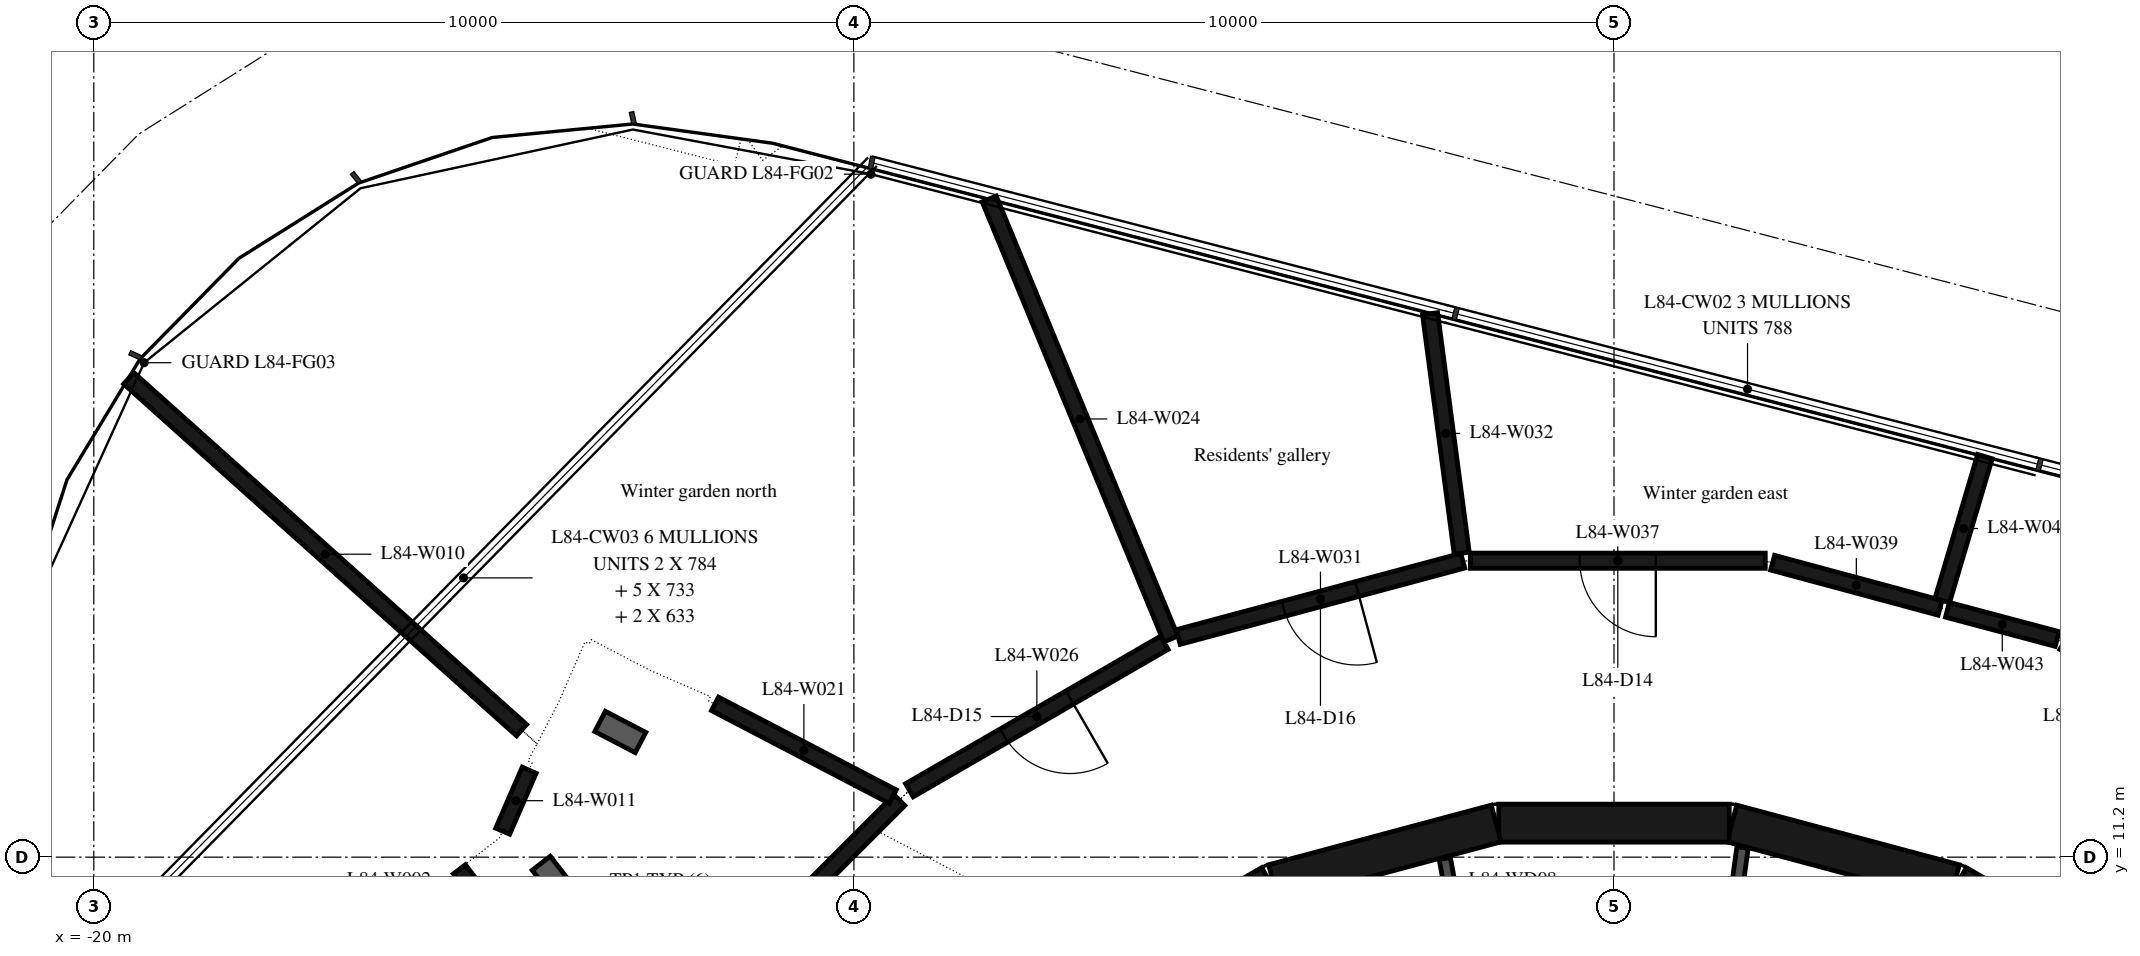
"""IFC4 building model, lengths in metres.
Left out: names, types, materials, properties, quantities, classifications, styles, units other than length and angle.
Written with IfcOpenShell. Run it as: python <this file> out.ifc"""

import sys

from ifc_helpers import new_model, si_unit, direction, frame, frame_2d, origin, place, context, subcontext, project, spatial, rectangle, extrude, element, fill, save


model = new_model("IFC4")
c1 = context("Model", 3, precision=1e-05, world=origin(), true_north=direction((0.0, 1.0)))
c2 = subcontext(c1, "Body", "Model", "MODEL_VIEW")
j1 = project(units=[si_unit("LENGTHUNIT", "METRE"), si_unit("PLANEANGLEUNIT", "RADIAN")], contexts=[c1])
p1 = place(None, origin())
s1 = spatial("IfcSite", under=j1, at=p1, CompositionType="ELEMENT")
p2 = place(p1, origin())
s2 = spatial("IfcBuilding", under=s1, at=p2, CompositionType="ELEMENT")
p3 = place(p2, frame((0.0, 0.0, 326.2)))
s3 = spatial("IfcBuildingStorey", under=s2, at=p3, CompositionType="ELEMENT", Elevation=326.2)
p4 = place(p3, frame((7.137, 9.329, 0.0), z_axis=(0.0, 0.0, 1.0), x_axis=(-0.865975092491, 0.500087131594, 0.0)))
e1 = element("IfcWall", 1, at=p4, inside=s3, PredefinedType="SHEAR", context=c2, shape_type="SweptSolid", body=[
    extrude(rectangle(XDim=3.033, YDim=0.5, at=frame_2d((1.516, 0.0))), origin(), (0.0, 0.0, 1.0), 6.35),
])
p5 = place(p4, frame((1.066, 0.0, 0.0)))
e2 = element("IfcOpeningElement", 2, at=p5, cuts=e1, PredefinedType="OPENING", context=c2, shape_type="SweptSolid", body=[
    extrude(rectangle(XDim=0.9, YDim=2.1, at=frame_2d((0.45, 1.05))), frame((0.0, 0.26, 0.0), z_axis=(0.0, -1.0, 0.0), x_axis=(1.0, 0.0, 0.0)), (0.0, 0.0, 1.0), 0.52),
])
for number, where, z_axis, x_axis in (
    (3, (4.479, 10.858, 0.0), (0.0, 0.0, 1.0), (-0.966, 0.259, 0.0)),
    (4, (1.516, 11.647, 0.0), (0.0, 0.0, 1.0), (-1.0, 0.0, 0.0)),
    (5, (-1.55, 11.643, 0.0), (0.0, 0.0, 1.0), (-0.966, -0.259, 0.0)),
    (6, (-4.51, 10.845, 0.0), (0.0, 0.0, 1.0), (-0.866, -0.5, 0.0)),
):
    element("IfcWall", number, at=place(p3, frame(where, z_axis=z_axis, x_axis=x_axis)), inside=s3, PredefinedType="SHEAR", context=c2, shape_type="SweptSolid", body=[
        extrude(rectangle(XDim=3.033, YDim=0.5, at=frame_2d((1.516, 0.0))), origin(), (0.0, 0.0, 1.0), 6.35),
    ])
p6 = place(p3, frame((1.691, 11.326, 0.0), z_axis=(0.0, 0.0, 1.0), x_axis=(-0.135344253201, -0.990798633994, 0.0)))
e7 = element("IfcWall", 7, at=p6, inside=s3, PredefinedType="PARTITIONING", context=c2, shape_type="SweptSolid", body=[
    extrude(rectangle(XDim=2.358, YDim=0.15, at=frame_2d((1.179, 0.0))), origin(), (0.0, 0.0, 1.0), 6.35),
])
p7 = place(p6, frame((0.729, 0.0, 0.0)))
e8 = element("IfcOpeningElement", 8, at=p7, cuts=e7, PredefinedType="OPENING", context=c2, shape_type="SweptSolid", body=[
    extrude(rectangle(XDim=0.9, YDim=2.1, at=frame_2d((0.45, 1.05))), frame((0.0, 0.085, 0.0), z_axis=(0.0, -1.0, 0.0), x_axis=(1.0, 0.0, 0.0)), (0.0, 0.0, 1.0), 0.17),
])
p8 = place(p3, frame((-1.825, 8.99, 0.0), z_axis=(0.0, 0.0, 1.0), x_axis=(-0.179955206115, 0.983674805915, 0.0)))
e9 = element("IfcWall", 9, at=p8, inside=s3, PredefinedType="PARTITIONING", context=c2, shape_type="SweptSolid", body=[
    extrude(rectangle(XDim=2.229, YDim=0.15, at=frame_2d((1.115, 0.0))), origin(), (0.0, 0.0, 1.0), 6.35),
])
p9 = place(p8, frame((0.665, 0.0, 0.0)))
e10 = element("IfcOpeningElement", 10, at=p9, cuts=e9, PredefinedType="OPENING", context=c2, shape_type="SweptSolid", body=[
    extrude(rectangle(XDim=0.9, YDim=2.1, at=frame_2d((0.45, 1.05))), frame((0.0, 0.085, 0.0), z_axis=(0.0, -1.0, 0.0), x_axis=(1.0, 0.0, 0.0)), (0.0, 0.0, 1.0), 0.17),
])
p10 = place(p3, frame((-15.19, 11.04, 0.0), z_axis=(0.0, 0.0, 1.0), x_axis=(0.604283722932, -0.796769215143, 0.0)))
e11 = element("IfcWall", 11, at=p10, inside=s3, PredefinedType="PARTITIONING", context=c2, shape_type="SweptSolid", body=[
    extrude(rectangle(XDim=0.364, YDim=0.2, at=frame_2d((0.182, 0.0))), origin(), (0.0, 0.0, 1.0), 6.35),
])
p11 = place(p3, frame((-14.372, 12.871, 0.0), z_axis=(0.0, 0.0, 1.0), x_axis=(-0.744887799674, 0.667189752542, 0.0)))
e12 = element("IfcWall", 12, at=p11, inside=s3, PredefinedType="PARTITIONING", context=c2, shape_type="SweptSolid", body=[
    extrude(rectangle(XDim=6.938, YDim=0.2, at=frame_2d((3.469, 0.0))), origin(), (0.0, 0.0, 1.0), 6.35),
])
p12 = place(p3, frame((-14.272, 12.344, 0.0), z_axis=(0.0, 0.0, 1.0), x_axis=(-0.39832800457, -0.91724304346, 0.0)))
e13 = element("IfcWall", 13, at=p12, inside=s3, PredefinedType="PARTITIONING", context=c2, shape_type="SweptSolid", body=[
    extrude(rectangle(XDim=0.875, YDim=0.2, at=frame_2d((0.437, 0.0))), origin(), (0.0, 0.0, 1.0), 6.35),
])
p13 = place(p3, frame((-12.009, 9.341, 0.0), z_axis=(0.0, 0.0, 1.0), x_axis=(0.707139861432, 0.707073699394, 0.0)))
e14 = element("IfcWall", 14, at=p13, inside=s3, PredefinedType="PARTITIONING", context=c2, shape_type="SweptSolid", body=[
    extrude(rectangle(XDim=3.69, YDim=0.2, at=frame_2d((1.845, 0.0))), origin(), (0.0, 0.0, 1.0), 6.35),
])
p14 = place(p3, frame((-9.489, 11.996, 0.0), z_axis=(0.0, 0.0, 1.0), x_axis=(-0.886536984928, 0.462657729163, 0.0)))
e15 = element("IfcWall", 15, at=p14, inside=s3, PredefinedType="PARTITIONING", context=c2, shape_type="SweptSolid", body=[
    extrude(rectangle(XDim=2.638, YDim=0.2, at=frame_2d((1.319, 0.0))), origin(), (0.0, 0.0, 1.0), 6.35),
])
p15 = place(p3, frame((-8.22, 19.86, 0.0), z_axis=(0.0, 0.0, 1.0), x_axis=(0.381535759917, -0.924354079292, 0.0)))
e16 = element("IfcWall", 16, at=p15, inside=s3, PredefinedType="PARTITIONING", context=c2, shape_type="SweptSolid", body=[
    extrude(rectangle(XDim=6.264, YDim=0.2, at=frame_2d((3.132, 0.0))), origin(), (0.0, 0.0, 1.0), 6.35),
])
p16 = place(p3, frame((-5.917, 14.02, 0.0), z_axis=(0.0, 0.0, 1.0), x_axis=(-0.865601686425, -0.500733182901, 0.0)))
e17 = element("IfcWall", 17, at=p16, inside=s3, PredefinedType="PARTITIONING", context=c2, shape_type="SweptSolid", body=[
    extrude(rectangle(XDim=3.874, YDim=0.2, at=frame_2d((1.937, 0.0))), origin(), (0.0, 0.0, 1.0), 6.35),
])
p17 = place(p16, frame((1.437, 0.0, 0.0)))
e18 = element("IfcOpeningElement", 18, at=p17, cuts=e17, PredefinedType="OPENING", context=c2, shape_type="SweptSolid", body=[
    extrude(rectangle(XDim=1.0, YDim=2.1, at=frame_2d((0.5, 1.05))), frame((0.0, 0.11, 0.0), z_axis=(0.0, -1.0, 0.0), x_axis=(1.0, 0.0, 0.0)), (0.0, 0.0, 1.0), 0.22),
])
p18 = place(p3, frame((-1.99, 15.1, 0.0), z_axis=(0.0, 0.0, 1.0), x_axis=(-0.96585437197, -0.259085569159, 0.0)))
e19 = element("IfcWall", 19, at=p18, inside=s3, PredefinedType="PARTITIONING", context=c2, shape_type="SweptSolid", body=[
    extrude(rectangle(XDim=3.876, YDim=0.2, at=frame_2d((1.938, 0.0))), origin(), (0.0, 0.0, 1.0), 6.35),
])
p19 = place(p18, frame((1.438, 0.0, 0.0)))
e20 = element("IfcOpeningElement", 20, at=p19, cuts=e19, PredefinedType="OPENING", context=c2, shape_type="SweptSolid", body=[
    extrude(rectangle(XDim=1.0, YDim=2.1, at=frame_2d((0.5, 1.05))), frame((0.0, 0.11, 0.0), z_axis=(0.0, -1.0, 0.0), x_axis=(1.0, 0.0, 0.0)), (0.0, 0.0, 1.0), 0.22),
])
p20 = place(p3, frame((-2.003, 15.199, 0.0), z_axis=(0.0, 0.0, 1.0), x_axis=(-0.131122124818, 0.99136622314, 0.0)))
e21 = element("IfcWall", 21, at=p20, inside=s3, PredefinedType="PARTITIONING", context=c2, shape_type="SweptSolid", body=[
    extrude(rectangle(XDim=3.178, YDim=0.2, at=frame_2d((1.589, 0.0))), origin(), (0.0, 0.0, 1.0), 6.35),
])
p21 = place(p3, frame((1.99, 15.1, 0.0), z_axis=(0.0, 0.0, 1.0), x_axis=(-1.0, 0.0, 0.0)))
e22 = element("IfcWall", 22, at=p21, inside=s3, PredefinedType="PARTITIONING", context=c2, shape_type="SweptSolid", body=[
    extrude(rectangle(XDim=3.88, YDim=0.2, at=frame_2d((1.94, 0.0))), origin(), (0.0, 0.0, 1.0), 6.35),
])
p22 = place(p21, frame((1.44, 0.0, 0.0)))
e23 = element("IfcOpeningElement", 23, at=p22, cuts=e22, PredefinedType="OPENING", context=c2, shape_type="SweptSolid", body=[
    extrude(rectangle(XDim=1.0, YDim=2.1, at=frame_2d((0.5, 1.05))), frame((0.0, 0.11, 0.0), z_axis=(0.0, -1.0, 0.0), x_axis=(1.0, 0.0, 0.0)), (0.0, 0.0, 1.0), 0.22),
])
p23 = place(p3, frame((4.29, 14.48, 0.0), z_axis=(0.0, 0.0, 1.0), x_axis=(-0.965529971304, 0.260291902513, 0.0)))
e24 = element("IfcWall", 24, at=p23, inside=s3, PredefinedType="PARTITIONING", context=c2, shape_type="SweptSolid", body=[
    extrude(rectangle(XDim=2.282, YDim=0.2, at=frame_2d((1.141, 0.0))), origin(), (0.0, 0.0, 1.0), 6.35),
])
p24 = place(p3, frame((4.318, 14.576, 0.0), z_axis=(0.0, 0.0, 1.0), x_axis=(0.284239804346, 0.958753218313, 0.0)))
e25 = element("IfcWall", 25, at=p24, inside=s3, PredefinedType="PARTITIONING", context=c2, shape_type="SweptSolid", body=[
    extrude(rectangle(XDim=1.976, YDim=0.2, at=frame_2d((0.988, 0.0))), origin(), (0.0, 0.0, 1.0), 6.35),
])
p25 = place(p3, frame((5.83, 14.07, 0.0), z_axis=(0.0, 0.0, 1.0), x_axis=(-0.966337953359, 0.257276038327, 0.0)))
e26 = element("IfcWall", 26, at=p25, inside=s3, PredefinedType="PARTITIONING", context=c2, shape_type="SweptSolid", body=[
    extrude(rectangle(XDim=1.494, YDim=0.2, at=frame_2d((0.747, 0.0))), origin(), (0.0, 0.0, 1.0), 6.35),
])
p26 = place(p3, frame((9.27, 12.08, 0.0), z_axis=(0.0, 0.0, 1.0), x_axis=(-0.865601686425, 0.500733182901, 0.0)))
e27 = element("IfcWall", 27, at=p26, inside=s3, PredefinedType="PARTITIONING", context=c2, shape_type="SweptSolid", body=[
    extrude(rectangle(XDim=3.874, YDim=0.2, at=frame_2d((1.937, 0.0))), origin(), (0.0, 0.0, 1.0), 6.35),
])
p27 = place(p26, frame((1.437, 0.0, 0.0)))
e28 = element("IfcOpeningElement", 28, at=p27, cuts=e27, PredefinedType="OPENING", context=c2, shape_type="SweptSolid", body=[
    extrude(rectangle(XDim=1.0, YDim=2.1, at=frame_2d((0.5, 1.05))), frame((0.0, 0.11, 0.0), z_axis=(0.0, -1.0, 0.0), x_axis=(1.0, 0.0, 0.0)), (0.0, 0.0, 1.0), 0.22),
])
p28 = place(p22, origin())
e29 = element("IfcDoor", 29, at=p28, inside=s3, OperationType="SINGLE_SWING_LEFT", PredefinedType="DOOR", context=c2, shape_type="SweptSolid", body=[
    extrude(rectangle(XDim=1.0, YDim=2.1, at=frame_2d((0.5, 1.05))), frame((0.0, 0.025, 0.0), z_axis=(0.0, -1.0, 0.0), x_axis=(1.0, 0.0, 0.0)), (0.0, 0.0, 1.0), 0.05),
])
fill(e23, e29)
p29 = place(p17, origin())
e30 = element("IfcDoor", 30, at=p29, inside=s3, OperationType="SINGLE_SWING_LEFT", PredefinedType="DOOR", context=c2, shape_type="SweptSolid", body=[
    extrude(rectangle(XDim=1.0, YDim=2.1, at=frame_2d((0.5, 1.05))), frame((0.0, 0.025, 0.0), z_axis=(0.0, -1.0, 0.0), x_axis=(1.0, 0.0, 0.0)), (0.0, 0.0, 1.0), 0.05),
])
fill(e18, e30)
p30 = place(p19, origin())
e31 = element("IfcDoor", 31, at=p30, inside=s3, OperationType="SINGLE_SWING_LEFT", PredefinedType="DOOR", context=c2, shape_type="SweptSolid", body=[
    extrude(rectangle(XDim=1.0, YDim=2.1, at=frame_2d((0.5, 1.05))), frame((0.0, 0.025, 0.0), z_axis=(0.0, -1.0, 0.0), x_axis=(1.0, 0.0, 0.0)), (0.0, 0.0, 1.0), 0.05),
])
fill(e20, e31)
save(model, sys.argv[1])
